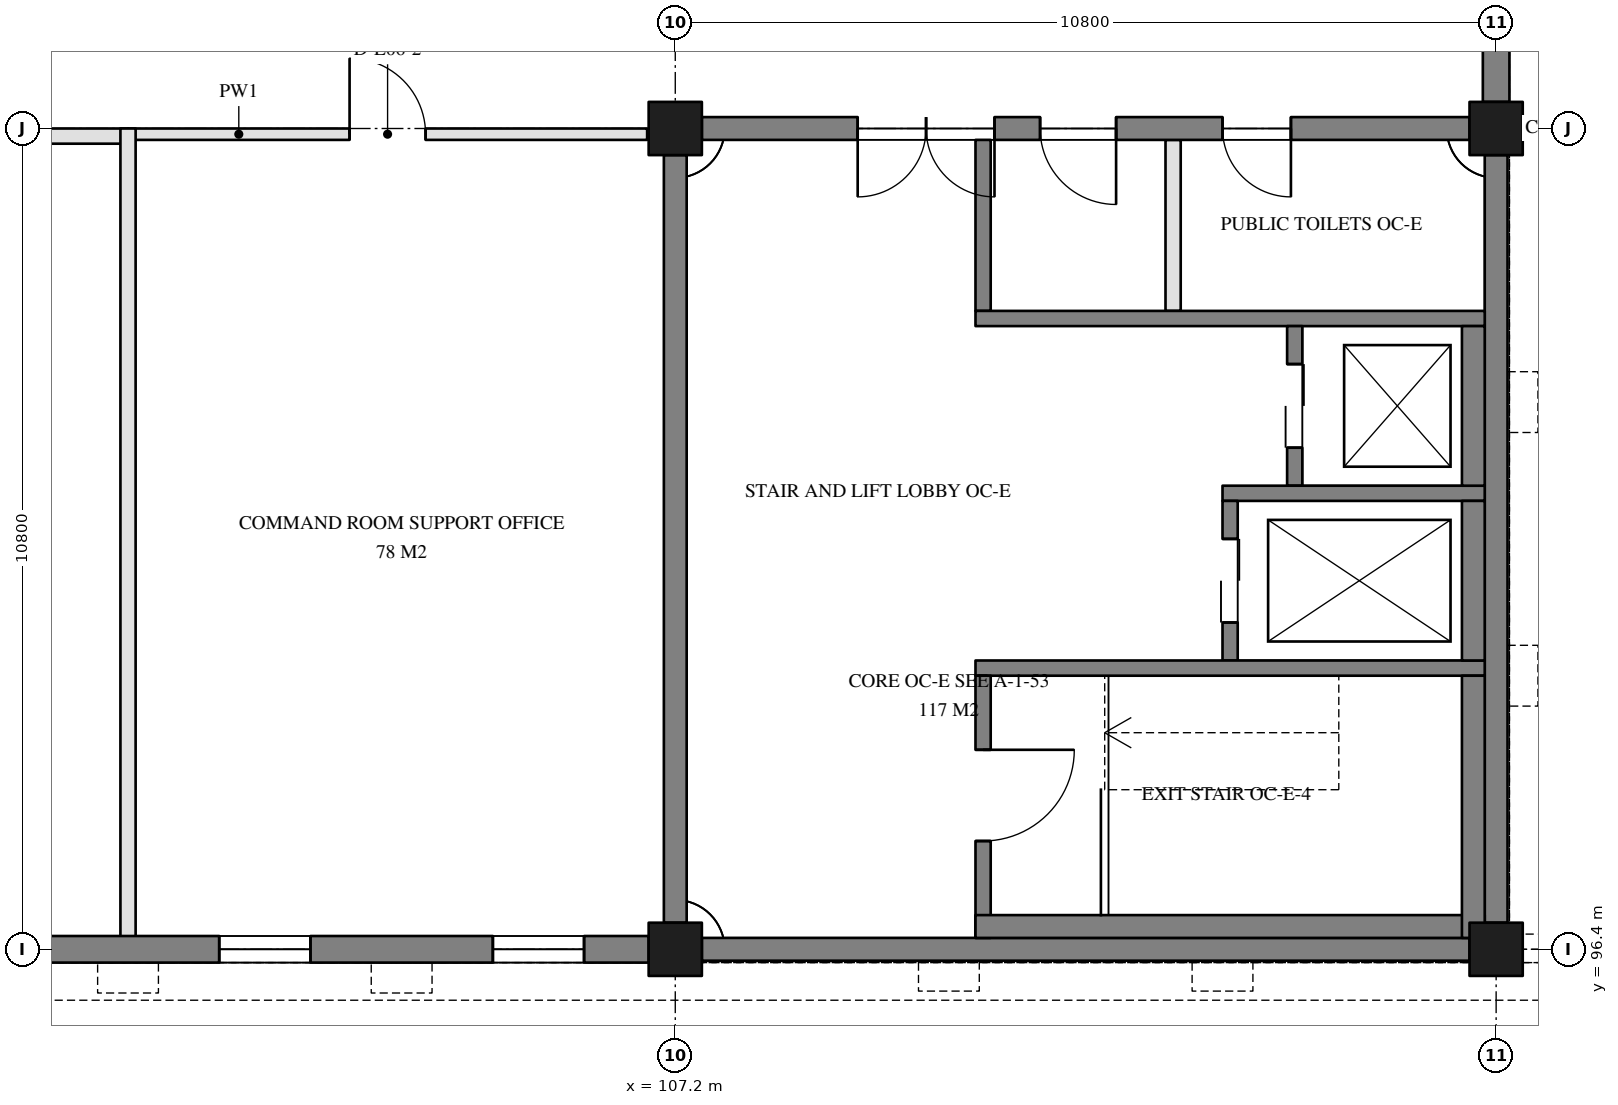
"""IFC4 building model, lengths in metres.
Left out: names, types, materials, properties, quantities, classifications, styles, units other than length and angle.
Written with IfcOpenShell. Run it as: python <this file> out.ifc"""

import sys

from ifc_helpers import new_model, si_unit, direction, frame, frame_2d, origin, origin_2d, place, context, subcontext, project, spatial, rectangle, extrude, element, fill, save


model = new_model("IFC4")
c1 = context("Model", 3, precision=1e-05, world=origin(), true_north=direction((0.0, 1.0)))
c2 = subcontext(c1, "Body", "Model", "MODEL_VIEW")
j1 = project(units=[si_unit("LENGTHUNIT", "METRE"), si_unit("PLANEANGLEUNIT", "RADIAN")], contexts=[c1])
p1 = place(None, origin())
s1 = spatial("IfcSite", under=j1, at=p1, CompositionType="ELEMENT")
p2 = place(p1, origin())
s2 = spatial("IfcBuilding", under=s1, at=p2, CompositionType="ELEMENT")
p3 = place(p2, frame((0.0, 0.0, 24.3)))
s3 = spatial("IfcBuildingStorey", under=s2, at=p3, CompositionType="ELEMENT", Elevation=24.3)
for number, where, z_axis, x_axis in (
    (1, (107.2, 96.4, 0.0), (0.0, 0.0, 1.0), (1.0, 0.0, 0.0)),
    (2, (107.2, 107.2, 0.0), (0.0, 0.0, 1.0), (1.0, 0.0, 0.0)),
    (3, (118.0, 96.4, 0.0), (0.0, 0.0, 1.0), (1.0, 0.0, 0.0)),
    (4, (118.0, 107.2, 0.0), (0.0, 0.0, 1.0), (1.0, 0.0, 0.0)),
):
    element("IfcColumn", number, at=place(p3, frame(where, z_axis=z_axis, x_axis=x_axis)), inside=s3, PredefinedType="COLUMN", context=c2, shape_type="SweptSolid", body=[
        extrude(rectangle(XDim=0.7, YDim=0.7, at=origin_2d()), origin(), (0.0, 0.0, 1.0), 3.9),
    ])
p4 = place(p3, frame((107.55, 96.4, 0.0), z_axis=(0.0, 0.0, 1.0), x_axis=(1.0, 0.0, 0.0)))
e5 = element("IfcWall", 5, at=p4, inside=s3, PredefinedType="SOLIDWALL", context=c2, shape_type="SweptSolid", body=[
    extrude(rectangle(XDim=10.1, YDim=0.3, at=frame_2d((5.05, 0.0))), origin(), (0.0, 0.0, 1.0), 3.9),
])
p5 = place(p3, frame((118.0, 96.75, 0.0), z_axis=(0.0, 0.0, 1.0), x_axis=(0.0, 1.0, 0.0)))
e6 = element("IfcWall", 6, at=p5, inside=s3, PredefinedType="SOLIDWALL", context=c2, shape_type="SweptSolid", body=[
    extrude(rectangle(XDim=10.1, YDim=0.3, at=frame_2d((5.05, 0.0))), origin(), (0.0, 0.0, 1.0), 3.9),
])
p6 = place(p3, frame((117.65, 107.2, 0.0), z_axis=(0.0, 0.0, 1.0), x_axis=(-1.0, 0.0, 0.0)))
e7 = element("IfcWall", 7, at=p6, inside=s3, PredefinedType="SOLIDWALL", context=c2, shape_type="SweptSolid", body=[
    extrude(rectangle(XDim=10.1, YDim=0.3, at=frame_2d((5.05, 0.0))), origin(), (0.0, 0.0, 1.0), 3.9),
])
p7 = place(p6, frame((6.25, 0.0, 0.0)))
e8 = element("IfcOpeningElement", 8, at=p7, cuts=e7, PredefinedType="OPENING", context=c2, shape_type="SweptSolid", body=[
    extrude(rectangle(XDim=1.8, YDim=2.1, at=frame_2d((0.9, 1.05))), frame((0.0, 0.16, 0.0), z_axis=(0.0, -1.0, 0.0), x_axis=(1.0, 0.0, 0.0)), (0.0, 0.0, 1.0), 0.32),
])
p8 = place(p6, frame((4.65, 0.0, 0.0)))
e9 = element("IfcOpeningElement", 9, at=p8, cuts=e7, PredefinedType="OPENING", context=c2, shape_type="SweptSolid", body=[
    extrude(rectangle(XDim=1.0, YDim=2.1, at=frame_2d((0.5, 1.05))), frame((0.0, 0.16, 0.0), z_axis=(0.0, -1.0, 0.0), x_axis=(1.0, 0.0, 0.0)), (0.0, 0.0, 1.0), 0.32),
])
p9 = place(p6, frame((2.35, 0.0, 0.0)))
e10 = element("IfcOpeningElement", 10, at=p9, cuts=e7, PredefinedType="OPENING", context=c2, shape_type="SweptSolid", body=[
    extrude(rectangle(XDim=0.9, YDim=2.1, at=frame_2d((0.45, 1.05))), frame((0.0, 0.16, 0.0), z_axis=(0.0, -1.0, 0.0), x_axis=(1.0, 0.0, 0.0)), (0.0, 0.0, 1.0), 0.32),
])
p10 = place(p3, frame((107.2, 106.85, 0.0), z_axis=(0.0, 0.0, 1.0), x_axis=(0.0, -1.0, 0.0)))
e11 = element("IfcWall", 11, at=p10, inside=s3, PredefinedType="SOLIDWALL", context=c2, shape_type="SweptSolid", body=[
    extrude(rectangle(XDim=10.1, YDim=0.3, at=frame_2d((5.05, 0.0))), origin(), (0.0, 0.0, 1.0), 3.9),
])
p11 = place(p3, frame((96.75, 96.4, 0.0), z_axis=(0.0, 0.0, 1.0), x_axis=(1.0, 0.0, 0.0)))
e12 = element("IfcWall", 12, at=p11, inside=s3, PredefinedType="SOLIDWALL", context=c2, shape_type="SweptSolid", body=[
    extrude(rectangle(XDim=10.1, YDim=0.35, at=frame_2d((5.05, 0.0))), origin(), (0.0, 0.0, 1.0), 2.95),
])
p12 = place(p11, frame((0.85, 0.0, 0.9)))
e13 = element("IfcOpeningElement", 13, at=p12, cuts=e12, PredefinedType="OPENING", context=c2, shape_type="SweptSolid", body=[
    extrude(rectangle(XDim=1.2, YDim=1.2, at=frame_2d((0.6, 0.6))), frame((0.0, 0.185, 0.0), z_axis=(0.0, -1.0, 0.0), x_axis=(1.0, 0.0, 0.0)), (0.0, 0.0, 1.0), 0.37),
])
p13 = place(p11, frame((4.45, 0.0, 0.9)))
e14 = element("IfcOpeningElement", 14, at=p13, cuts=e12, PredefinedType="OPENING", context=c2, shape_type="SweptSolid", body=[
    extrude(rectangle(XDim=1.2, YDim=1.2, at=frame_2d((0.6, 0.6))), frame((0.0, 0.185, 0.0), z_axis=(0.0, -1.0, 0.0), x_axis=(1.0, 0.0, 0.0)), (0.0, 0.0, 1.0), 0.37),
])
p14 = place(p11, frame((8.05, 0.0, 0.9)))
e15 = element("IfcOpeningElement", 15, at=p14, cuts=e12, PredefinedType="OPENING", context=c2, shape_type="SweptSolid", body=[
    extrude(rectangle(XDim=1.2, YDim=1.2, at=frame_2d((0.6, 0.6))), frame((0.0, 0.185, 0.0), z_axis=(0.0, -1.0, 0.0), x_axis=(1.0, 0.0, 0.0)), (0.0, 0.0, 1.0), 0.37),
])
p15 = place(p3, frame((118.0, 107.55, 0.0), z_axis=(0.0, 0.0, 1.0), x_axis=(0.0, 1.0, 0.0)))
e16 = element("IfcWall", 16, at=p15, inside=s3, PredefinedType="SOLIDWALL", context=c2, shape_type="SweptSolid", body=[
    extrude(rectangle(XDim=3.85, YDim=0.35, at=frame_2d((1.925, 0.0))), origin(), (0.0, 0.0, 1.0), 2.95),
])
p16 = place(p15, frame((0.85, 0.0, 0.9)))
e17 = element("IfcOpeningElement", 17, at=p16, cuts=e16, PredefinedType="OPENING", context=c2, shape_type="SweptSolid", body=[
    extrude(rectangle(XDim=1.2, YDim=1.2, at=frame_2d((0.6, 0.6))), frame((0.0, 0.185, 0.0), z_axis=(0.0, -1.0, 0.0), x_axis=(1.0, 0.0, 0.0)), (0.0, 0.0, 1.0), 0.37),
])
p17 = place(p3, frame((111.25, 107.05, 0.0), z_axis=(0.0, 0.0, 1.0), x_axis=(0.0, -1.0, 0.0)))
e18 = element("IfcWall", 18, at=p17, inside=s3, PredefinedType="SOLIDWALL", context=c2, shape_type="SweptSolid", body=[
    extrude(rectangle(XDim=2.25, YDim=0.2, at=frame_2d((1.125, 0.0))), origin(), (0.0, 0.0, 1.0), 3.9),
])
p18 = place(p3, frame((111.15, 104.7, 0.0), z_axis=(0.0, 0.0, 1.0), x_axis=(1.0, 0.0, 0.0)))
e19 = element("IfcWall", 19, at=p18, inside=s3, PredefinedType="SOLIDWALL", context=c2, shape_type="SweptSolid", body=[
    extrude(rectangle(XDim=6.7, YDim=0.2, at=frame_2d((3.35, 0.0))), origin(), (0.0, 0.0, 1.0), 3.9),
])
p19 = place(p3, frame((115.35, 104.6, 0.0), z_axis=(0.0, 0.0, 1.0), x_axis=(0.0, -1.0, 0.0)))
e20 = element("IfcWall", 20, at=p19, inside=s3, PredefinedType="SOLIDWALL", context=c2, shape_type="SweptSolid", body=[
    extrude(rectangle(XDim=2.1, YDim=0.2, at=frame_2d((1.05, 0.0))), origin(), (0.0, 0.0, 1.0), 3.9),
])
p20 = place(p19, frame((0.5, 0.0, 0.0)))
e21 = element("IfcOpeningElement", 21, at=p20, cuts=e20, PredefinedType="OPENING", context=c2, shape_type="SweptSolid", body=[
    extrude(rectangle(XDim=1.1, YDim=2.1, at=frame_2d((0.55, 1.05))), frame((0.0, 0.11, 0.0), z_axis=(0.0, -1.0, 0.0), x_axis=(1.0, 0.0, 0.0)), (0.0, 0.0, 1.0), 0.22),
])
p21 = place(p3, frame((114.4, 102.4, 0.0), z_axis=(0.0, 0.0, 1.0), x_axis=(1.0, 0.0, 0.0)))
e22 = element("IfcWall", 22, at=p21, inside=s3, PredefinedType="SOLIDWALL", context=c2, shape_type="SweptSolid", body=[
    extrude(rectangle(XDim=3.45, YDim=0.2, at=frame_2d((1.725, 0.0))), origin(), (0.0, 0.0, 1.0), 3.9),
])
p22 = place(p3, frame((114.5, 102.3, 0.0), z_axis=(0.0, 0.0, 1.0), x_axis=(0.0, -1.0, 0.0)))
e23 = element("IfcWall", 23, at=p22, inside=s3, PredefinedType="SOLIDWALL", context=c2, shape_type="SweptSolid", body=[
    extrude(rectangle(XDim=2.1, YDim=0.2, at=frame_2d((1.05, 0.0))), origin(), (0.0, 0.0, 1.0), 3.9),
])
p23 = place(p22, frame((0.5, 0.0, 0.0)))
e24 = element("IfcOpeningElement", 24, at=p23, cuts=e23, PredefinedType="OPENING", context=c2, shape_type="SweptSolid", body=[
    extrude(rectangle(XDim=1.1, YDim=2.1, at=frame_2d((0.55, 1.05))), frame((0.0, 0.11, 0.0), z_axis=(0.0, -1.0, 0.0), x_axis=(1.0, 0.0, 0.0)), (0.0, 0.0, 1.0), 0.22),
])
p24 = place(p3, frame((111.15, 100.1, 0.0), z_axis=(0.0, 0.0, 1.0), x_axis=(1.0, 0.0, 0.0)))
e25 = element("IfcWall", 25, at=p24, inside=s3, PredefinedType="SOLIDWALL", context=c2, shape_type="SweptSolid", body=[
    extrude(rectangle(XDim=6.7, YDim=0.2, at=frame_2d((3.35, 0.0))), origin(), (0.0, 0.0, 1.0), 3.9),
])
p25 = place(p3, frame((111.25, 100.0, 0.0), z_axis=(0.0, 0.0, 1.0), x_axis=(0.0, -1.0, 0.0)))
e26 = element("IfcWall", 26, at=p25, inside=s3, PredefinedType="SOLIDWALL", context=c2, shape_type="SweptSolid", body=[
    extrude(rectangle(XDim=3.45, YDim=0.2, at=frame_2d((1.725, 0.0))), origin(), (0.0, 0.0, 1.0), 3.9),
])
p26 = place(p25, frame((0.975, 0.0, 0.0)))
e27 = element("IfcOpeningElement", 27, at=p26, cuts=e26, PredefinedType="OPENING", context=c2, shape_type="SweptSolid", body=[
    extrude(rectangle(XDim=1.2, YDim=2.1, at=frame_2d((0.6, 1.05))), frame((0.0, 0.11, 0.0), z_axis=(0.0, -1.0, 0.0), x_axis=(1.0, 0.0, 0.0)), (0.0, 0.0, 1.0), 0.22),
])
p27 = place(p3, frame((111.15, 96.7, -0.3), z_axis=(0.0, 0.0, 1.0), x_axis=(1.0, 0.0, 0.0)))
e28 = element("IfcWall", 28, at=p27, inside=s3, PredefinedType="SOLIDWALL", context=c2, shape_type="SweptSolid", body=[
    extrude(rectangle(XDim=6.7, YDim=0.3, at=frame_2d((3.35, 0.0))), origin(), (0.0, 0.0, 1.0), 4.2),
])
p28 = place(p3, frame((117.7, 100.0, -0.3), z_axis=(0.0, 0.0, 1.0), x_axis=(0.0, -1.0, 0.0)))
e29 = element("IfcWall", 29, at=p28, inside=s3, PredefinedType="SOLIDWALL", context=c2, shape_type="SweptSolid", body=[
    extrude(rectangle(XDim=3.45, YDim=0.3, at=frame_2d((1.725, 0.0))), origin(), (0.0, 0.0, 1.0), 4.2),
])
for number, where, z_axis, x_axis in (
    (30, (117.7, 104.6, -0.3), (0.0, 0.0, 1.0), (0.0, -1.0, 0.0)),
    (31, (117.7, 102.3, -0.3), (0.0, 0.0, 1.0), (0.0, -1.0, 0.0)),
):
    element("IfcWall", number, at=place(p3, frame(where, z_axis=z_axis, x_axis=x_axis)), inside=s3, PredefinedType="SOLIDWALL", context=c2, shape_type="SweptSolid", body=[
        extrude(rectangle(XDim=2.1, YDim=0.3, at=frame_2d((1.05, 0.0))), origin(), (0.0, 0.0, 1.0), 4.2),
    ])
p29 = place(p3, frame((113.75, 107.05, 0.0), z_axis=(0.0, 0.0, 1.0), x_axis=(0.0, -1.0, 0.0)))
e32 = element("IfcWall", 32, at=p29, inside=s3, PredefinedType="PARTITIONING", context=c2, shape_type="SweptSolid", body=[
    extrude(rectangle(XDim=2.25, YDim=0.2, at=frame_2d((1.125, 0.0))), origin(), (0.0, 0.0, 1.0), 3.9),
])
p30 = place(p3, frame((96.77, 107.1, 0.0), z_axis=(0.0, 0.0, 1.0), x_axis=(1.0, 0.0, 0.0)))
e33 = element("IfcWall", 33, at=p30, inside=s3, PredefinedType="PARTITIONING", context=c2, shape_type="SweptSolid", body=[
    extrude(rectangle(XDim=3.23, YDim=0.2, at=frame_2d((1.615, 0.0))), origin(), (0.0, 0.0, 1.0), 3.75),
])
p31 = place(p3, frame((100.0, 107.125, 0.0), z_axis=(0.0, 0.0, 1.0), x_axis=(1.0, 0.0, 0.0)))
e34 = element("IfcWall", 34, at=p31, inside=s3, PredefinedType="PARTITIONING", context=c2, shape_type="SweptSolid", body=[
    extrude(rectangle(XDim=6.83, YDim=0.15, at=frame_2d((3.415, 0.0))), origin(), (0.0, 0.0, 1.0), 3.75),
])
p32 = place(p31, frame((2.915, 0.0, 0.0)))
e35 = element("IfcOpeningElement", 35, at=p32, cuts=e34, PredefinedType="OPENING", context=c2, shape_type="SweptSolid", body=[
    extrude(rectangle(XDim=1.0, YDim=2.1, at=frame_2d((0.5, 1.05))), frame((0.0, 0.085, 0.0), z_axis=(0.0, -1.0, 0.0), x_axis=(1.0, 0.0, 0.0)), (0.0, 0.0, 1.0), 0.17),
])
p33 = place(p3, frame((100.0, 96.4, 0.0), z_axis=(0.0, 0.0, 1.0), x_axis=(0.0, 1.0, 0.0)))
e36 = element("IfcWall", 36, at=p33, inside=s3, PredefinedType="PARTITIONING", context=c2, shape_type="SweptSolid", body=[
    extrude(rectangle(XDim=10.8, YDim=0.2, at=frame_2d((5.4, 0.0))), origin(), (0.0, 0.0, 1.0), 2.95),
])
p34 = place(p13, origin())
e37 = element("IfcWindow", 37, at=p34, inside=s3, PartitioningType="SINGLE_PANEL", PredefinedType="WINDOW", context=c2, shape_type="SweptSolid", body=[
    extrude(rectangle(XDim=1.2, YDim=1.2, at=frame_2d((0.6, 0.6))), frame((0.0, 0.03, 0.0), z_axis=(0.0, -1.0, 0.0), x_axis=(1.0, 0.0, 0.0)), (0.0, 0.0, 1.0), 0.06),
])
fill(e14, e37)
p35 = place(p14, origin())
e38 = element("IfcWindow", 38, at=p35, inside=s3, PartitioningType="SINGLE_PANEL", PredefinedType="WINDOW", context=c2, shape_type="SweptSolid", body=[
    extrude(rectangle(XDim=1.2, YDim=1.2, at=frame_2d((0.6, 0.6))), frame((0.0, 0.03, 0.0), z_axis=(0.0, -1.0, 0.0), x_axis=(1.0, 0.0, 0.0)), (0.0, 0.0, 1.0), 0.06),
])
fill(e15, e38)
p36 = place(p20, frame((1.1, 0.0, 0.0), z_axis=(0.0, 0.0, 1.0), x_axis=(-1.0, 0.0, 0.0)))
e39 = element("IfcDoor", 39, at=p36, inside=s3, OperationType="DOUBLE_DOOR_SLIDING", PredefinedType="DOOR", context=c2, shape_type="SweptSolid", body=[
    extrude(rectangle(XDim=1.1, YDim=2.1, at=frame_2d((0.55, 1.05))), frame((0.0, 0.025, 0.0), z_axis=(0.0, -1.0, 0.0), x_axis=(1.0, 0.0, 0.0)), (0.0, 0.0, 1.0), 0.05),
])
fill(e21, e39)
p37 = place(p23, frame((1.1, 0.0, 0.0), z_axis=(0.0, 0.0, 1.0), x_axis=(-1.0, 0.0, 0.0)))
e40 = element("IfcDoor", 40, at=p37, inside=s3, OperationType="DOUBLE_DOOR_SLIDING", PredefinedType="DOOR", context=c2, shape_type="SweptSolid", body=[
    extrude(rectangle(XDim=1.1, YDim=2.1, at=frame_2d((0.55, 1.05))), frame((0.0, 0.025, 0.0), z_axis=(0.0, -1.0, 0.0), x_axis=(1.0, 0.0, 0.0)), (0.0, 0.0, 1.0), 0.05),
])
fill(e24, e40)
p38 = place(p26, frame((1.2, 0.0, 0.0), z_axis=(0.0, 0.0, 1.0), x_axis=(-1.0, 0.0, 0.0)))
e41 = element("IfcDoor", 41, at=p38, inside=s3, OperationType="SINGLE_SWING_RIGHT", PredefinedType="DOOR", context=c2, shape_type="SweptSolid", body=[
    extrude(rectangle(XDim=1.2, YDim=2.1, at=frame_2d((0.6, 1.05))), frame((0.0, 0.025, 0.0), z_axis=(0.0, -1.0, 0.0), x_axis=(1.0, 0.0, 0.0)), (0.0, 0.0, 1.0), 0.05),
])
fill(e27, e41)
p39 = place(p7, frame((1.8, 0.0, 0.0), z_axis=(0.0, 0.0, 1.0), x_axis=(-1.0, 0.0, 0.0)))
e42 = element("IfcDoor", 42, at=p39, inside=s3, OperationType="DOUBLE_DOOR_DOUBLE_SWING", PredefinedType="DOOR", context=c2, shape_type="SweptSolid", body=[
    extrude(rectangle(XDim=1.8, YDim=2.1, at=frame_2d((0.9, 1.05))), frame((0.0, 0.025, 0.0), z_axis=(0.0, -1.0, 0.0), x_axis=(1.0, 0.0, 0.0)), (0.0, 0.0, 1.0), 0.05),
])
fill(e8, e42)
p40 = place(p8, origin())
e43 = element("IfcDoor", 43, at=p40, inside=s3, OperationType="SINGLE_SWING_RIGHT", PredefinedType="DOOR", context=c2, shape_type="SweptSolid", body=[
    extrude(rectangle(XDim=1.0, YDim=2.1, at=frame_2d((0.5, 1.05))), frame((0.0, 0.025, 0.0), z_axis=(0.0, -1.0, 0.0), x_axis=(1.0, 0.0, 0.0)), (0.0, 0.0, 1.0), 0.05),
])
fill(e9, e43)
p41 = place(p9, origin())
e44 = element("IfcDoor", 44, at=p41, inside=s3, OperationType="SINGLE_SWING_LEFT", PredefinedType="DOOR", context=c2, shape_type="SweptSolid", body=[
    extrude(rectangle(XDim=0.9, YDim=2.1, at=frame_2d((0.45, 1.05))), frame((0.0, 0.025, 0.0), z_axis=(0.0, -1.0, 0.0), x_axis=(1.0, 0.0, 0.0)), (0.0, 0.0, 1.0), 0.05),
])
fill(e10, e44)
p42 = place(p32, frame((1.0, 0.0, 0.0), z_axis=(0.0, 0.0, 1.0), x_axis=(-1.0, 0.0, 0.0)))
e45 = element("IfcDoor", 45, at=p42, inside=s3, OperationType="SINGLE_SWING_RIGHT", PredefinedType="DOOR", context=c2, shape_type="SweptSolid", body=[
    extrude(rectangle(XDim=1.0, YDim=2.1, at=frame_2d((0.5, 1.05))), frame((0.0, 0.025, 0.0), z_axis=(0.0, -1.0, 0.0), x_axis=(1.0, 0.0, 0.0)), (0.0, 0.0, 1.0), 0.05),
])
fill(e35, e45)
save(model, sys.argv[1])
